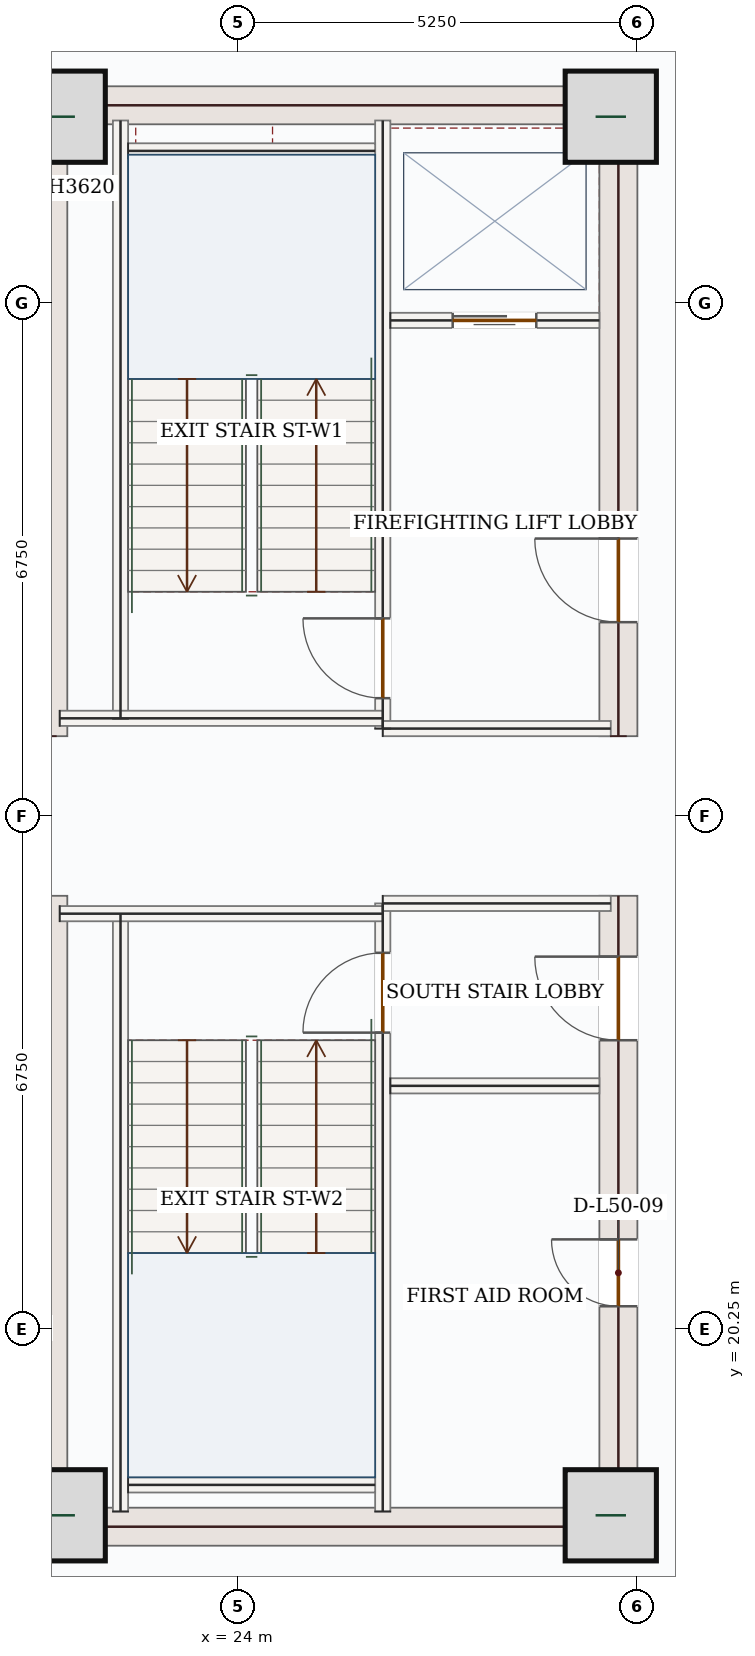
"""IFC4 building model, lengths in metres.
Left out: names, types, materials, properties, quantities, classifications, styles, units other than length and angle.
Written with IfcOpenShell. Run it as: python <this file> out.ifc"""

import sys

from ifc_helpers import new_model, si_unit, direction, frame, frame_2d, origin, origin_2d, place, context, subcontext, project, spatial, rectangle, extrude, source, transform, mapped, element, fill, save


model = new_model("IFC4")
c1 = context("Model", 3, precision=1e-05, world=origin(), true_north=direction((0.0, 1.0)))
c2 = subcontext(c1, "Body", "Model", "MODEL_VIEW")
j1 = project(units=[si_unit("LENGTHUNIT", "METRE"), si_unit("PLANEANGLEUNIT", "RADIAN")], contexts=[c1])
p1 = place(None, origin())
s1 = spatial("IfcSite", under=j1, at=p1, CompositionType="ELEMENT")
p2 = place(p1, origin())
s2 = spatial("IfcBuilding", under=s1, at=p2, CompositionType="ELEMENT")
p3 = place(p2, frame((0.0, 0.0, 213.6)))
s3 = spatial("IfcBuildingStorey", under=s2, at=p3, CompositionType="ELEMENT", Elevation=213.6)
m1 = source(origin(), c2, "Body", "SweptSolid", [
    extrude(rectangle(XDim=8.55, YDim=0.5, at=frame_2d((4.275, 0.0))), origin(), (0.0, 0.0, 1.0), 3.62),
])
for number, where, z_axis, x_axis in (
    (1, (21.5, 17.4, 0.0), (0.0, 0.0, 1.0), (0.0, 1.0, 0.0)),
    (2, (21.5, 28.05, 0.0), (0.0, 0.0, 1.0), (0.0, 1.0, 0.0)),
):
    element("IfcWall", number, at=place(p3, frame(where, z_axis=z_axis, x_axis=x_axis)), inside=s3, PredefinedType="SHEAR", context=c2, shape_type="MappedRepresentation", body=[
        mapped(m1, transform((0.0, 0.0, 0.0), x_axis=(1.0, 0.0, 0.0), y_axis=(0.0, 1.0, 0.0), z_axis=(0.0, 0.0, 1.0), scale=1.0)),
    ])
p4 = place(p3, frame((29.0, 17.4, 0.0), z_axis=(0.0, 0.0, 1.0), x_axis=(0.0, 1.0, 0.0)))
e3 = element("IfcWall", 3, at=p4, inside=s3, PredefinedType="SHEAR", context=c2, shape_type="SweptSolid", body=[
    extrude(rectangle(XDim=8.55, YDim=0.5, at=frame_2d((4.275, 0.0))), origin(), (0.0, 0.0, 1.0), 3.62),
])
p5 = place(p4, frame((6.65, 0.0, 0.0)))
e4 = element("IfcOpeningElement", 4, at=p5, cuts=e3, PredefinedType="OPENING", context=c2, shape_type="SweptSolid", body=[
    extrude(rectangle(XDim=1.1, YDim=2.2, at=frame_2d((0.55, 1.1))), frame((0.0, 0.26, 0.0), z_axis=(0.0, -1.0, 0.0), x_axis=(1.0, 0.0, 0.0)), (0.0, 0.0, 1.0), 0.52),
])
p6 = place(p4, frame((3.15, 0.0, 0.0)))
e5 = element("IfcOpeningElement", 5, at=p6, cuts=e3, PredefinedType="OPENING", context=c2, shape_type="SweptSolid", body=[
    extrude(rectangle(XDim=0.88, YDim=2.1, at=frame_2d((0.44, 1.05))), frame((0.0, 0.26, 0.0), z_axis=(0.0, -1.0, 0.0), x_axis=(1.0, 0.0, 0.0)), (0.0, 0.0, 1.0), 0.52),
])
p7 = place(p3, frame((29.0, 28.05, 0.0), z_axis=(0.0, 0.0, 1.0), x_axis=(0.0, 1.0, 0.0)))
e6 = element("IfcWall", 6, at=p7, inside=s3, PredefinedType="SHEAR", context=c2, shape_type="SweptSolid", body=[
    extrude(rectangle(XDim=8.55, YDim=0.5, at=frame_2d((4.275, 0.0))), origin(), (0.0, 0.0, 1.0), 3.62),
])
p8 = place(p7, frame((1.5, 0.0, 0.0)))
e7 = element("IfcOpeningElement", 7, at=p8, cuts=e6, PredefinedType="OPENING", context=c2, shape_type="SweptSolid", body=[
    extrude(rectangle(XDim=1.1, YDim=2.2, at=frame_2d((0.55, 1.1))), frame((0.0, 0.26, 0.0), z_axis=(0.0, -1.0, 0.0), x_axis=(1.0, 0.0, 0.0)), (0.0, 0.0, 1.0), 0.52),
])
m2 = source(origin(), c2, "Body", "SweptSolid", [
    extrude(rectangle(XDim=7.0, YDim=0.5, at=frame_2d((3.5, 0.0))), origin(), (0.0, 0.0, 1.0), 3.62),
])
for number, where, z_axis, x_axis in (
    (8, (21.75, 17.65, 0.0), (0.0, 0.0, 1.0), (1.0, 0.0, 0.0)),
    (9, (21.75, 36.35, 0.0), (0.0, 0.0, 1.0), (1.0, 0.0, 0.0)),
):
    element("IfcWall", number, at=place(p3, frame(where, z_axis=z_axis, x_axis=x_axis)), inside=s3, PredefinedType="SHEAR", context=c2, shape_type="MappedRepresentation", body=[
        mapped(m2, transform((0.0, 0.0, 0.0), x_axis=(1.0, 0.0, 0.0), y_axis=(0.0, 1.0, 0.0), z_axis=(0.0, 0.0, 1.0), scale=1.0)),
    ])
m3 = source(origin(), c2, "Body", "SweptSolid", [
    extrude(rectangle(XDim=1.2, YDim=1.2, at=origin_2d()), origin(), (0.0, 0.0, 1.0), 3.9),
])
for number, where, z_axis, x_axis in (
    (10, (21.65, 17.8, 0.0), (0.0, 0.0, 1.0), (1.0, 0.0, 0.0)),
    (11, (28.9, 17.8, 0.0), (0.0, 0.0, 1.0), (1.0, 0.0, 0.0)),
    (12, (21.65, 36.2, 0.0), (0.0, 0.0, 1.0), (1.0, 0.0, 0.0)),
    (13, (28.9, 36.2, 0.0), (0.0, 0.0, 1.0), (1.0, 0.0, 0.0)),
):
    element("IfcColumn", number, at=place(p3, frame(where, z_axis=z_axis, x_axis=x_axis)), inside=s3, PredefinedType="COLUMN", context=c2, shape_type="MappedRepresentation", body=[
        mapped(m3, transform((0.0, 0.0, 0.0), x_axis=(1.0, 0.0, 0.0), y_axis=(0.0, 1.0, 0.0), z_axis=(0.0, 0.0, 1.0), scale=1.0)),
    ])
m4 = source(origin(), c2, "Body", "SweptSolid", [
    extrude(rectangle(XDim=5.258, YDim=0.28, at=frame_2d((2.629, 0.0))), origin(), (0.0, 0.0, 1.0), 3.62),
])
p9 = place(p3, frame((18.94, 35.542, 0.0), z_axis=(0.0, 0.0, 1.0), x_axis=(0.707106781187, 0.707106781187, 0.0)))
e14 = element("IfcWall", 14, at=p9, inside=s3, PredefinedType="SOLIDWALL", context=c2, shape_type="MappedRepresentation", body=[
    mapped(m4, transform((0.0, 0.0, 0.0), x_axis=(1.0, 0.0, 0.0), y_axis=(0.0, 1.0, 0.0), z_axis=(0.0, 0.0, 1.0), scale=1.0)),
])
m5 = source(origin(), c2, "Body", "SweptSolid", [
    extrude(rectangle(XDim=7.87, YDim=0.2, at=frame_2d((3.935, 0.0))), origin(), (0.0, 0.0, 1.0), 3.62),
])
for number, where, z_axis, x_axis in (
    (15, (22.45, 17.85, 0.0), (0.0, 0.0, 1.0), (0.0, 1.0, 0.0)),
    (16, (22.45, 28.28, 0.0), (0.0, 0.0, 1.0), (0.0, 1.0, 0.0)),
):
    element("IfcWall", number, at=place(p3, frame(where, z_axis=z_axis, x_axis=x_axis)), inside=s3, PredefinedType="SOLIDWALL", context=c2, shape_type="MappedRepresentation", body=[
        mapped(m5, transform((0.0, 0.0, 0.0), x_axis=(1.0, 0.0, 0.0), y_axis=(0.0, 1.0, 0.0), z_axis=(0.0, 0.0, 1.0), scale=1.0)),
    ])
p10 = place(p3, frame((25.9, 17.85, 0.0), z_axis=(0.0, 0.0, 1.0), x_axis=(0.0, 1.0, 0.0)))
e17 = element("IfcWall", 17, at=p10, inside=s3, PredefinedType="SOLIDWALL", context=c2, shape_type="SweptSolid", body=[
    extrude(rectangle(XDim=8.0, YDim=0.2, at=frame_2d((4.0, 0.0))), origin(), (0.0, 0.0, 1.0), 3.62),
])
p11 = place(p10, frame((6.3, 0.0, 0.0)))
e18 = element("IfcOpeningElement", 18, at=p11, cuts=e17, PredefinedType="OPENING", context=c2, shape_type="SweptSolid", body=[
    extrude(rectangle(XDim=1.05, YDim=2.15, at=frame_2d((0.525, 1.075))), frame((0.0, 0.11, 0.0), z_axis=(0.0, -1.0, 0.0), x_axis=(1.0, 0.0, 0.0)), (0.0, 0.0, 1.0), 0.22),
])
p12 = place(p3, frame((25.9, 28.15, 0.0), z_axis=(0.0, 0.0, 1.0), x_axis=(0.0, 1.0, 0.0)))
e19 = element("IfcWall", 19, at=p12, inside=s3, PredefinedType="SOLIDWALL", context=c2, shape_type="SweptSolid", body=[
    extrude(rectangle(XDim=8.0, YDim=0.2, at=frame_2d((4.0, 0.0))), origin(), (0.0, 0.0, 1.0), 3.62),
])
p13 = place(p12, frame((0.4, 0.0, 0.0)))
e20 = element("IfcOpeningElement", 20, at=p13, cuts=e19, PredefinedType="OPENING", context=c2, shape_type="SweptSolid", body=[
    extrude(rectangle(XDim=1.05, YDim=2.15, at=frame_2d((0.525, 1.075))), frame((0.0, 0.11, 0.0), z_axis=(0.0, -1.0, 0.0), x_axis=(1.0, 0.0, 0.0)), (0.0, 0.0, 1.0), 0.22),
])
m6 = source(origin(), c2, "Body", "SweptSolid", [
    extrude(rectangle(XDim=4.25, YDim=0.2, at=frame_2d((2.125, 0.0))), origin(), (0.0, 0.0, 1.0), 3.62),
])
p14 = place(p3, frame((21.65, 25.715, 0.0), z_axis=(0.0, 0.0, 1.0), x_axis=(1.0, 0.0, 0.0)))
e21 = element("IfcWall", 21, at=p14, inside=s3, PredefinedType="SOLIDWALL", context=c2, shape_type="MappedRepresentation", body=[
    mapped(m6, transform((0.0, 0.0, 0.0), x_axis=(1.0, 0.0, 0.0), y_axis=(0.0, 1.0, 0.0), z_axis=(0.0, 0.0, 1.0), scale=1.0)),
])
m7 = source(origin(), c2, "Body", "SweptSolid", [
    extrude(rectangle(XDim=3.0, YDim=0.2, at=frame_2d((1.5, 0.0))), origin(), (0.0, 0.0, 1.0), 3.62),
])
p15 = place(p3, frame((25.9, 25.85, 0.0), z_axis=(0.0, 0.0, 1.0), x_axis=(1.0, 0.0, 0.0)))
e22 = element("IfcWall", 22, at=p15, inside=s3, PredefinedType="SOLIDWALL", context=c2, shape_type="MappedRepresentation", body=[
    mapped(m7, transform((0.0, 0.0, 0.0), x_axis=(1.0, 0.0, 0.0), y_axis=(0.0, 1.0, 0.0), z_axis=(0.0, 0.0, 1.0), scale=1.0)),
])
p16 = place(p3, frame((21.65, 28.285, 0.0), z_axis=(0.0, 0.0, 1.0), x_axis=(1.0, 0.0, 0.0)))
e23 = element("IfcWall", 23, at=p16, inside=s3, PredefinedType="SOLIDWALL", context=c2, shape_type="MappedRepresentation", body=[
    mapped(m6, transform((0.0, 0.0, 0.0), x_axis=(1.0, 0.0, 0.0), y_axis=(0.0, 1.0, 0.0), z_axis=(0.0, 0.0, 1.0), scale=1.0)),
])
p17 = place(p3, frame((25.9, 28.15, 0.0), z_axis=(0.0, 0.0, 1.0), x_axis=(1.0, 0.0, 0.0)))
e24 = element("IfcWall", 24, at=p17, inside=s3, PredefinedType="SOLIDWALL", context=c2, shape_type="MappedRepresentation", body=[
    mapped(m7, transform((0.0, 0.0, 0.0), x_axis=(1.0, 0.0, 0.0), y_axis=(0.0, 1.0, 0.0), z_axis=(0.0, 0.0, 1.0), scale=1.0)),
])
m8 = source(origin(), c2, "Body", "SweptSolid", [
    extrude(rectangle(XDim=3.25, YDim=0.2, at=frame_2d((1.625, 0.0))), origin(), (0.0, 0.0, 1.0), 3.62),
])
for number, where, z_axis, x_axis in (
    (25, (22.55, 35.75, 0.0), (0.0, 0.0, 1.0), (1.0, 0.0, 0.0)),
    (26, (22.55, 18.2, 0.0), (0.0, 0.0, 1.0), (1.0, 0.0, 0.0)),
):
    element("IfcWall", number, at=place(p3, frame(where, z_axis=z_axis, x_axis=x_axis)), inside=s3, PredefinedType="SOLIDWALL", context=c2, shape_type="MappedRepresentation", body=[
        mapped(m8, transform((0.0, 0.0, 0.0), x_axis=(1.0, 0.0, 0.0), y_axis=(0.0, 1.0, 0.0), z_axis=(0.0, 0.0, 1.0), scale=1.0)),
    ])
p18 = place(p3, frame((26.0, 33.52, 0.0), z_axis=(0.0, 0.0, 1.0), x_axis=(1.0, 0.0, 0.0)))
e27 = element("IfcWall", 27, at=p18, inside=s3, PredefinedType="SOLIDWALL", context=c2, shape_type="SweptSolid", body=[
    extrude(rectangle(XDim=2.75, YDim=0.2, at=frame_2d((1.375, 0.0))), origin(), (0.0, 0.0, 1.0), 3.62),
])
p19 = place(p18, frame((0.82, 0.0, 0.0)))
e28 = element("IfcOpeningElement", 28, at=p19, cuts=e27, PredefinedType="OPENING", context=c2, shape_type="SweptSolid", body=[
    extrude(rectangle(XDim=1.1, YDim=2.15, at=frame_2d((0.55, 1.075))), frame((0.0, 0.11, 0.0), z_axis=(0.0, -1.0, 0.0), x_axis=(1.0, 0.0, 0.0)), (0.0, 0.0, 1.0), 0.22),
])
m9 = source(origin(), c2, "Body", "SweptSolid", [
    extrude(rectangle(XDim=2.75, YDim=0.2, at=frame_2d((1.375, 0.0))), origin(), (0.0, 0.0, 1.0), 3.62),
])
p20 = place(p3, frame((26.0, 23.45, 0.0), z_axis=(0.0, 0.0, 1.0), x_axis=(1.0, 0.0, 0.0)))
e29 = element("IfcWall", 29, at=p20, inside=s3, PredefinedType="SOLIDWALL", context=c2, shape_type="MappedRepresentation", body=[
    mapped(m9, transform((0.0, 0.0, 0.0), x_axis=(1.0, 0.0, 0.0), y_axis=(0.0, 1.0, 0.0), z_axis=(0.0, 0.0, 1.0), scale=1.0)),
])
m10 = source(origin(), c2, "Body", "SweptSolid", [
    extrude(rectangle(XDim=1.05, YDim=2.15, at=frame_2d((0.525, 1.075))), frame((0.0, 0.025, 0.0), z_axis=(0.0, -1.0, 0.0), x_axis=(1.0, 0.0, 0.0)), (0.0, 0.0, 1.0), 0.05),
])
p21 = place(p13, origin())
e30 = element("IfcDoor", 30, at=p21, inside=s3, OperationType="SINGLE_SWING_RIGHT", PredefinedType="DOOR", context=c2, shape_type="MappedRepresentation", body=[
    mapped(m10, transform((0.0, 0.0, 0.0), x_axis=(1.0, 0.0, 0.0), y_axis=(0.0, 1.0, 0.0), z_axis=(0.0, 0.0, 1.0), scale=1.0)),
])
fill(e20, e30)
p22 = place(p11, origin())
e31 = element("IfcDoor", 31, at=p22, inside=s3, OperationType="SINGLE_SWING_LEFT", PredefinedType="DOOR", context=c2, shape_type="MappedRepresentation", body=[
    mapped(m10, transform((0.0, 0.0, 0.0), x_axis=(1.0, 0.0, 0.0), y_axis=(0.0, 1.0, 0.0), z_axis=(0.0, 0.0, 1.0), scale=1.0)),
])
fill(e18, e31)
m11 = source(origin(), c2, "Body", "SweptSolid", [
    extrude(rectangle(XDim=1.1, YDim=2.15, at=frame_2d((0.55, 1.075))), frame((0.0, 0.025, 0.0), z_axis=(0.0, -1.0, 0.0), x_axis=(1.0, 0.0, 0.0)), (0.0, 0.0, 1.0), 0.05),
])
p23 = place(p19, origin())
e32 = element("IfcDoor", 32, at=p23, inside=s3, OperationType="DOUBLE_DOOR_SLIDING", PredefinedType="DOOR", context=c2, shape_type="MappedRepresentation", body=[
    mapped(m11, transform((0.0, 0.0, 0.0), x_axis=(1.0, 0.0, 0.0), y_axis=(0.0, 1.0, 0.0), z_axis=(0.0, 0.0, 1.0), scale=1.0)),
])
fill(e28, e32)
m12 = source(origin(), c2, "Body", "SweptSolid", [
    extrude(rectangle(XDim=1.1, YDim=2.2, at=frame_2d((0.55, 1.1))), frame((0.0, 0.025, 0.0), z_axis=(0.0, -1.0, 0.0), x_axis=(1.0, 0.0, 0.0)), (0.0, 0.0, 1.0), 0.05),
])
p24 = place(p8, origin())
e33 = element("IfcDoor", 33, at=p24, inside=s3, OperationType="SINGLE_SWING_RIGHT", PredefinedType="DOOR", context=c2, shape_type="MappedRepresentation", body=[
    mapped(m12, transform((0.0, 0.0, 0.0), x_axis=(1.0, 0.0, 0.0), y_axis=(0.0, 1.0, 0.0), z_axis=(0.0, 0.0, 1.0), scale=1.0)),
])
fill(e7, e33)
p25 = place(p5, origin())
e34 = element("IfcDoor", 34, at=p25, inside=s3, OperationType="SINGLE_SWING_RIGHT", PredefinedType="DOOR", context=c2, shape_type="MappedRepresentation", body=[
    mapped(m12, transform((0.0, 0.0, 0.0), x_axis=(1.0, 0.0, 0.0), y_axis=(0.0, 1.0, 0.0), z_axis=(0.0, 0.0, 1.0), scale=1.0)),
])
fill(e4, e34)
m13 = source(origin(), c2, "Body", "SweptSolid", [
    extrude(rectangle(XDim=0.88, YDim=2.1, at=frame_2d((0.44, 1.05))), frame((0.0, 0.025, 0.0), z_axis=(0.0, -1.0, 0.0), x_axis=(1.0, 0.0, 0.0)), (0.0, 0.0, 1.0), 0.05),
])
p26 = place(p6, origin())
e35 = element("IfcDoor", 35, at=p26, inside=s3, OperationType="SINGLE_SWING_RIGHT", PredefinedType="DOOR", context=c2, shape_type="MappedRepresentation", body=[
    mapped(m13, transform((0.0, 0.0, 0.0), x_axis=(1.0, 0.0, 0.0), y_axis=(0.0, 1.0, 0.0), z_axis=(0.0, 0.0, 1.0), scale=1.0)),
])
fill(e5, e35)
save(model, sys.argv[1])
